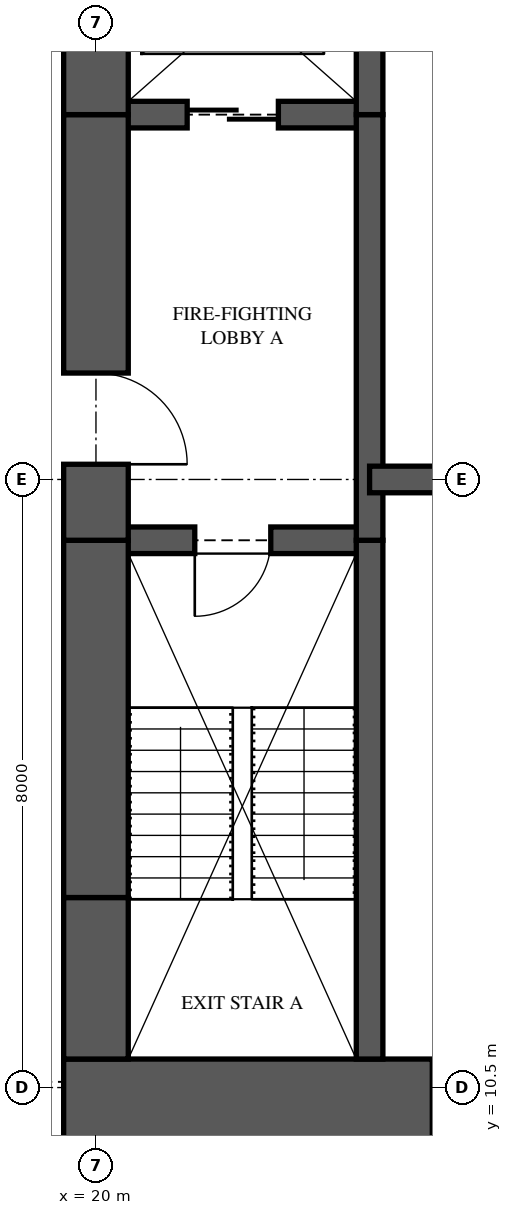
"""IFC4 building model, lengths in metres.
Left out: names, types, materials, properties, quantities, classifications, styles, units other than length and angle.
Written with IfcOpenShell. Run it as: python <this file> out.ifc"""

import sys

from ifc_helpers import new_model, si_unit, direction, frame, frame_2d, origin, place, context, subcontext, project, spatial, rectangle, extrude, element, fill, save


model = new_model("IFC4")
c1 = context("Model", 3, precision=1e-05, world=origin(), true_north=direction((0.0, 1.0)))
c2 = subcontext(c1, "Body", "Model", "MODEL_VIEW")
j1 = project(units=[si_unit("LENGTHUNIT", "METRE"), si_unit("PLANEANGLEUNIT", "RADIAN")], contexts=[c1])
p1 = place(None, origin())
s1 = spatial("IfcSite", under=j1, at=p1, CompositionType="ELEMENT")
p2 = place(p1, origin())
s2 = spatial("IfcBuilding", under=s1, at=p2, CompositionType="ELEMENT")
p3 = place(p2, frame((0.0, 0.0, 101.5)))
s3 = spatial("IfcBuildingStorey", under=s2, at=p3, CompositionType="ELEMENT", Elevation=101.5)
p4 = place(p3, frame((19.575, 10.125, 0.0), z_axis=(0.0, 0.0, 1.0), x_axis=(1.0, 0.0, 0.0)))
e1 = element("IfcWall", 1, at=p4, inside=s3, PredefinedType="SHEAR", context=c2, shape_type="SweptSolid", body=[
    extrude(rectangle(XDim=6.425, YDim=1.5, at=frame_2d((3.212, 0.0))), origin(), (0.0, 0.0, 1.0), 3.35),
])
p5 = place(p4, frame((4.85, 0.0, 0.0)))
e2 = element("IfcOpeningElement", 2, at=p5, cuts=e1, PredefinedType="OPENING", context=c2, shape_type="SweptSolid", body=[
    extrude(rectangle(XDim=0.75, YDim=2.1, at=frame_2d((0.375, 1.05))), frame((0.0, 0.76, 0.0), z_axis=(0.0, -1.0, 0.0), x_axis=(1.0, 0.0, 0.0)), (0.0, 0.0, 1.0), 1.52),
])
p6 = place(p3, frame((20.0, 26.125, 0.0), z_axis=(0.0, 0.0, 1.0), x_axis=(0.0, -1.0, 0.0)))
e3 = element("IfcWall", 3, at=p6, inside=s3, PredefinedType="SHEAR", context=c2, shape_type="SweptSolid", body=[
    extrude(rectangle(XDim=2.825, YDim=0.85, at=frame_2d((1.413, 0.0))), origin(), (0.0, 0.0, 1.0), 3.35),
])
p7 = place(p3, frame((20.0, 23.3, 0.0), z_axis=(0.0, 0.0, 1.0), x_axis=(0.0, -1.0, 0.0)))
e4 = element("IfcWall", 4, at=p7, inside=s3, PredefinedType="SHEAR", context=c2, shape_type="SweptSolid", body=[
    extrude(rectangle(XDim=5.6, YDim=0.85, at=frame_2d((2.8, 0.0))), origin(), (0.0, 0.0, 1.0), 3.35),
])
p8 = place(p7, frame((3.4, 0.0, 0.0)))
e5 = element("IfcOpeningElement", 5, at=p8, cuts=e4, PredefinedType="OPENING", context=c2, shape_type="SweptSolid", body=[
    extrude(rectangle(XDim=1.2, YDim=2.2, at=frame_2d((0.6, 1.1))), frame((0.0, 0.435, 0.0), z_axis=(0.0, -1.0, 0.0), x_axis=(1.0, 0.0, 0.0)), (0.0, 0.0, 1.0), 0.87),
])
p9 = place(p3, frame((20.0, 17.7, 0.0), z_axis=(0.0, 0.0, 1.0), x_axis=(0.0, -1.0, 0.0)))
e6 = element("IfcWall", 6, at=p9, inside=s3, PredefinedType="SHEAR", context=c2, shape_type="SweptSolid", body=[
    extrude(rectangle(XDim=4.7, YDim=0.85, at=frame_2d((2.35, 0.0))), origin(), (0.0, 0.0, 1.0), 3.35),
])
p10 = place(p3, frame((20.0, 13.0, 0.0), z_axis=(0.0, 0.0, 1.0), x_axis=(0.0, -1.0, 0.0)))
e7 = element("IfcWall", 7, at=p10, inside=s3, PredefinedType="SHEAR", context=c2, shape_type="SweptSolid", body=[
    extrude(rectangle(XDim=2.125, YDim=0.85, at=frame_2d((1.062, 0.0))), origin(), (0.0, 0.0, 1.0), 3.35),
])
p11 = place(p3, frame((23.6, 10.875, 0.0), z_axis=(0.0, 0.0, 1.0), x_axis=(0.0, 1.0, 0.0)))
e8 = element("IfcWall", 8, at=p11, inside=s3, PredefinedType="SHEAR", context=c2, shape_type="SweptSolid", body=[
    extrude(rectangle(XDim=6.825, YDim=0.35, at=frame_2d((3.413, 0.0))), origin(), (0.0, 0.0, 1.0), 3.35),
])
p12 = place(p3, frame((23.6, 17.7, 0.0), z_axis=(0.0, 0.0, 1.0), x_axis=(0.0, 1.0, 0.0)))
e9 = element("IfcWall", 9, at=p12, inside=s3, PredefinedType="SHEAR", context=c2, shape_type="SweptSolid", body=[
    extrude(rectangle(XDim=5.6, YDim=0.35, at=frame_2d((2.8, 0.0))), origin(), (0.0, 0.0, 1.0), 3.35),
])
p13 = place(p3, frame((23.6, 23.3, 0.0), z_axis=(0.0, 0.0, 1.0), x_axis=(0.0, 1.0, 0.0)))
e10 = element("IfcWall", 10, at=p13, inside=s3, PredefinedType="SHEAR", context=c2, shape_type="SweptSolid", body=[
    extrude(rectangle(XDim=2.825, YDim=0.35, at=frame_2d((1.413, 0.0))), origin(), (0.0, 0.0, 1.0), 3.35),
])
p14 = place(p3, frame((20.0, 17.7, 0.0), z_axis=(0.0, 0.0, 1.0), x_axis=(1.0, 0.0, 0.0)))
e11 = element("IfcWall", 11, at=p14, inside=s3, PredefinedType="SHEAR", context=c2, shape_type="SweptSolid", body=[
    extrude(rectangle(XDim=3.6, YDim=0.35, at=frame_2d((1.8, 0.0))), origin(), (0.0, 0.0, 1.0), 3.35),
])
p15 = place(p14, frame((1.3, 0.0, 0.0)))
e12 = element("IfcOpeningElement", 12, at=p15, cuts=e11, PredefinedType="OPENING", context=c2, shape_type="SweptSolid", body=[
    extrude(rectangle(XDim=1.0, YDim=2.1, at=frame_2d((0.5, 1.05))), frame((0.0, 0.185, 0.0), z_axis=(0.0, -1.0, 0.0), x_axis=(1.0, 0.0, 0.0)), (0.0, 0.0, 1.0), 0.37),
])
p16 = place(p3, frame((20.0, 23.3, 0.0), z_axis=(0.0, 0.0, 1.0), x_axis=(1.0, 0.0, 0.0)))
e13 = element("IfcWall", 13, at=p16, inside=s3, PredefinedType="SHEAR", context=c2, shape_type="SweptSolid", body=[
    extrude(rectangle(XDim=3.6, YDim=0.35, at=frame_2d((1.8, 0.0))), origin(), (0.0, 0.0, 1.0), 3.35),
])
p17 = place(p16, frame((1.2, 0.0, 0.0)))
e14 = element("IfcOpeningElement", 14, at=p17, cuts=e13, PredefinedType="OPENING", context=c2, shape_type="SweptSolid", body=[
    extrude(rectangle(XDim=1.2, YDim=2.1, at=frame_2d((0.6, 1.05))), frame((0.0, 0.185, 0.0), z_axis=(0.0, -1.0, 0.0), x_axis=(1.0, 0.0, 0.0)), (0.0, 0.0, 1.0), 0.37),
])
p18 = place(p3, frame((23.6, 18.5, 0.0), z_axis=(0.0, 0.0, 1.0), x_axis=(1.0, 0.0, 0.0)))
e15 = element("IfcWall", 15, at=p18, inside=s3, PredefinedType="SHEAR", context=c2, shape_type="SweptSolid", body=[
    extrude(rectangle(XDim=2.4, YDim=0.35, at=frame_2d((1.2, 0.0))), origin(), (0.0, 0.0, 1.0), 3.35),
])
p19 = place(p15, frame((1.0, 0.0, 0.0), z_axis=(0.0, 0.0, 1.0), x_axis=(-1.0, 0.0, 0.0)))
e16 = element("IfcDoor", 16, at=p19, inside=s3, OperationType="SINGLE_SWING_RIGHT", PredefinedType="DOOR", context=c2, shape_type="SweptSolid", body=[
    extrude(rectangle(XDim=1.0, YDim=2.1, at=frame_2d((0.5, 1.05))), frame((0.0, 0.025, 0.0), z_axis=(0.0, -1.0, 0.0), x_axis=(1.0, 0.0, 0.0)), (0.0, 0.0, 1.0), 0.05),
])
fill(e12, e16)
p20 = place(p8, origin())
e17 = element("IfcDoor", 17, at=p20, inside=s3, OperationType="SINGLE_SWING_RIGHT", PredefinedType="DOOR", context=c2, shape_type="SweptSolid", body=[
    extrude(rectangle(XDim=1.2, YDim=2.2, at=frame_2d((0.6, 1.1))), frame((0.0, 0.025, 0.0), z_axis=(0.0, -1.0, 0.0), x_axis=(1.0, 0.0, 0.0)), (0.0, 0.0, 1.0), 0.05),
])
fill(e5, e17)
p21 = place(p17, origin())
e18 = element("IfcDoor", 18, at=p21, inside=s3, OperationType="SLIDING_TO_LEFT", PredefinedType="DOOR", context=c2, shape_type="SweptSolid", body=[
    extrude(rectangle(XDim=1.2, YDim=2.1, at=frame_2d((0.6, 1.05))), frame((0.0, 0.025, 0.0), z_axis=(0.0, -1.0, 0.0), x_axis=(1.0, 0.0, 0.0)), (0.0, 0.0, 1.0), 0.05),
])
fill(e14, e18)
save(model, sys.argv[1])
